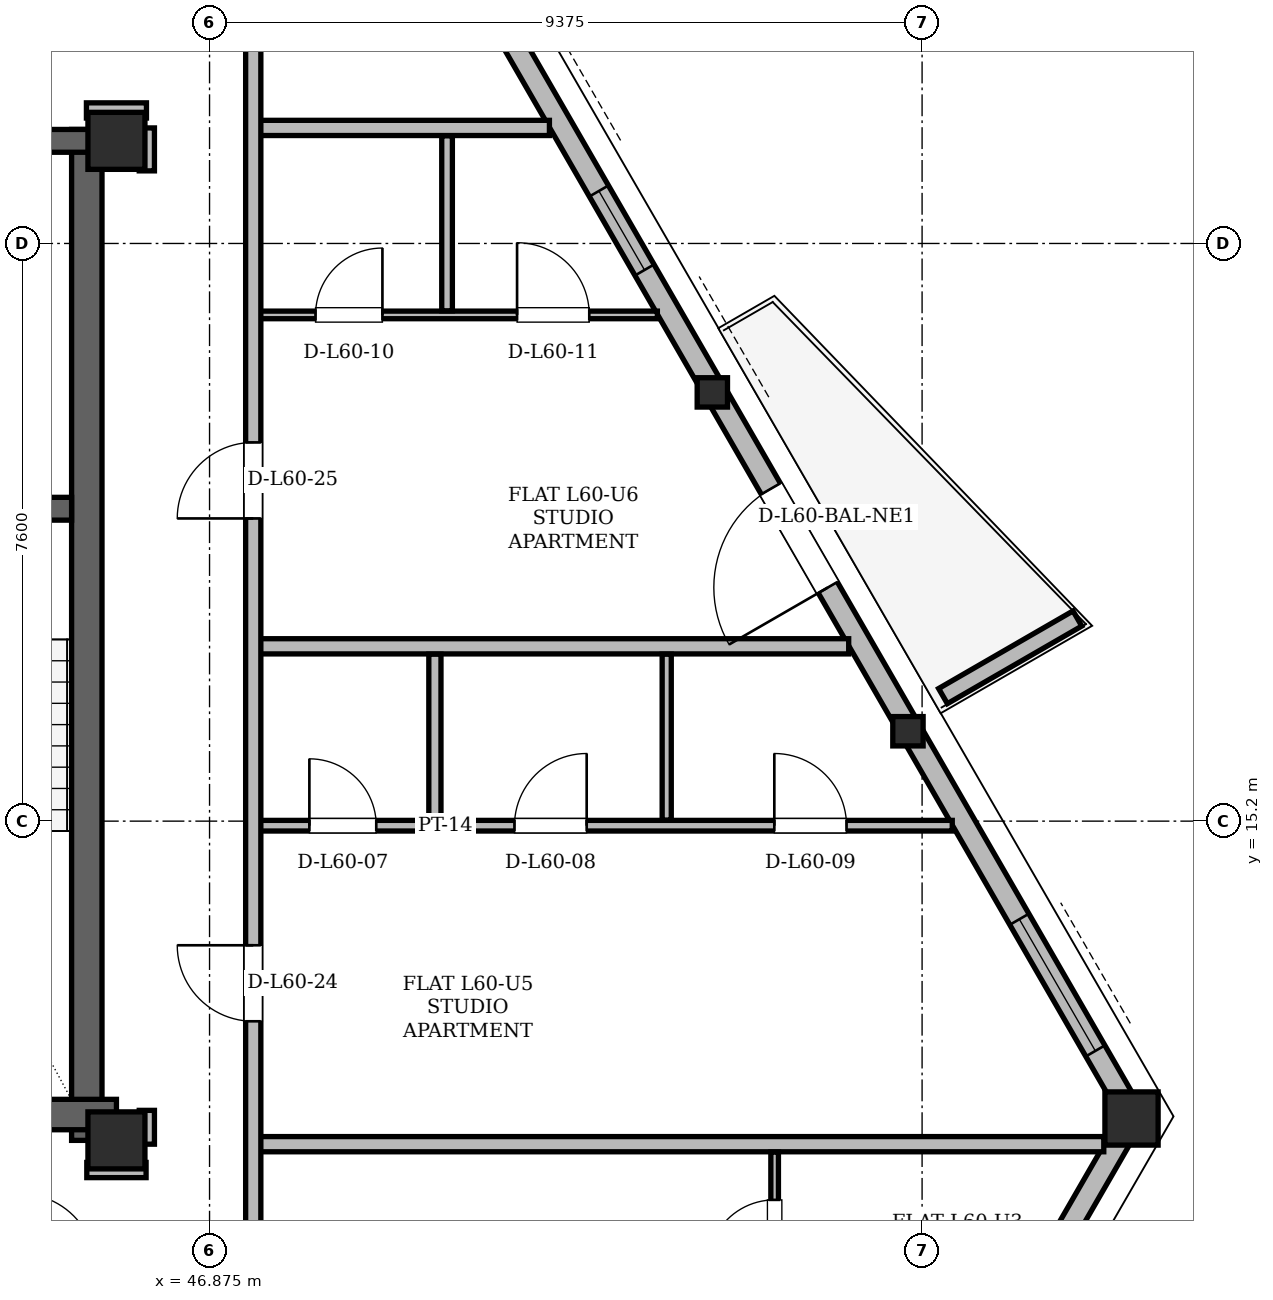
"""IFC4 building model, lengths in metres.
Left out: names, types, materials, properties, quantities, classifications, styles, units other than length and angle.
Written with IfcOpenShell. Run it as: python <this file> out.ifc"""

import sys

from ifc_helpers import new_model, si_unit, direction, frame, frame_2d, origin, origin_2d, place, context, subcontext, project, spatial, polyline, rectangle, hollow_rectangle, i_section, outline, extrude, element, fill, save


model = new_model("IFC4")
c1 = context("Model", 3, precision=1e-05, world=origin(), true_north=direction((0.0, 1.0)))
c2 = subcontext(c1, "Body", "Model", "MODEL_VIEW")
j1 = project(units=[si_unit("LENGTHUNIT", "METRE"), si_unit("PLANEANGLEUNIT", "RADIAN")], contexts=[c1])
p1 = place(None, origin())
s1 = spatial("IfcSite", under=j1, at=p1, CompositionType="ELEMENT")
p2 = place(p1, origin())
s2 = spatial("IfcBuilding", under=s1, at=p2, CompositionType="ELEMENT")
p3 = place(p2, frame((0.0, 0.0, 227.1)))
s3 = spatial("IfcBuildingStorey", under=s2, at=p3, CompositionType="ELEMENT", Elevation=227.1)
for number, where, z_axis, x_axis in (
    (1, (45.65, 11.0, 0.0), (0.0, 0.0, 1.0), (1.0, 0.0, 0.0)),
    (2, (45.65, 24.15, 0.0), (0.0, 0.0, 1.0), (1.0, 0.0, 0.0)),
):
    element("IfcColumn", number, at=place(p3, frame(where, z_axis=z_axis, x_axis=x_axis)), inside=s3, PredefinedType="COLUMN", context=c2, shape_type="SweptSolid", body=[
        extrude(hollow_rectangle(XDim=0.75, YDim=0.75, WallThickness=0.06, at=origin_2d()), origin(), (0.0, 0.0, 1.0), 3.6),
    ])
p4 = place(p3, frame((59.027, 11.316, 0.004), z_axis=(-0.011895219528, -0.015429799045, 0.999810194514), x_axis=(0.791975050651, -0.610553453145, 0.0)))
e3 = element("IfcColumn", 3, at=p4, inside=s3, PredefinedType="COLUMN", context=c2, shape_type="SweptSolid", body=[
    extrude(hollow_rectangle(XDim=0.7, YDim=0.7, WallThickness=0.055, at=origin_2d()), origin(), (0.0, 0.0, 1.0), 3.592),
])
p5 = place(p3, frame((56.088, 16.407, 0.004), z_axis=(-0.013118912573, -0.013390807134, 0.999824274769), x_axis=(0.714321588262, -0.699817596622, 0.0)))
e4 = element("IfcColumn", 4, at=p5, inside=s3, PredefinedType="COLUMN", context=c2, shape_type="SweptSolid", body=[
    extrude(i_section(OverallWidth=0.399, OverallDepth=0.386, WebThickness=0.021, FlangeThickness=0.033, at=origin_2d()), origin(), (0.0, 0.0, 1.0), 3.592),
])
p6 = place(p3, frame((53.516, 20.861, 0.004), z_axis=(-0.014138644368, -0.011555622801, 0.999833269259), x_axis=(0.632832277922, -0.774288904751, 0.0)))
e5 = element("IfcColumn", 5, at=p6, inside=s3, PredefinedType="COLUMN", context=c2, shape_type="SweptSolid", body=[
    extrude(i_section(OverallWidth=0.399, OverallDepth=0.386, WebThickness=0.021, FlangeThickness=0.033, at=origin_2d()), origin(), (0.0, 0.0, 1.0), 3.592),
])
p7 = place(p3, frame((45.26, 11.0, 0.0), z_axis=(0.0, 0.0, 1.0), x_axis=(0.0, 1.0, 0.0)))
e6 = element("IfcWall", 6, at=p7, inside=s3, PredefinedType="SHEAR", context=c2, shape_type="SweptSolid", body=[
    extrude(rectangle(XDim=13.3, YDim=0.4, at=frame_2d((6.65, 0.0))), origin(), (0.0, 0.0, 1.0), 3.38),
])
p8 = place(p3, frame((38.55, 11.34, 0.0), z_axis=(0.0, 0.0, 1.0), x_axis=(1.0, 0.0, 0.0)))
e7 = element("IfcWall", 7, at=p8, inside=s3, PredefinedType="SHEAR", context=c2, shape_type="SweptSolid", body=[
    extrude(rectangle(XDim=7.1, YDim=0.4, at=frame_2d((3.55, 0.0))), origin(), (0.0, 0.0, 1.0), 3.38),
])
p9 = place(p3, frame((29.65, 24.15, 0.0), z_axis=(0.0, 0.0, 1.0), x_axis=(1.0, 0.0, 0.0)))
e8 = element("IfcWall", 8, at=p9, inside=s3, PredefinedType="SHEAR", context=c2, shape_type="SweptSolid", body=[
    extrude(rectangle(XDim=15.7, YDim=0.3, at=frame_2d((7.85, 0.0))), origin(), (0.0, 0.0, 1.0), 3.38),
])
p10 = place(p9, frame((1.7, 0.0, 0.0)))
e9 = element("IfcOpeningElement", 9, at=p10, cuts=e8, PredefinedType="OPENING", context=c2, shape_type="SweptSolid", body=[
    extrude(rectangle(XDim=1.2, YDim=2.2, at=frame_2d((0.6, 1.1))), frame((0.0, 0.15, 0.0), z_axis=(0.0, -1.0, 0.0), x_axis=(1.0, 0.0, 0.0)), (0.0, 0.0, 1.0), 0.3),
])
p11 = place(p9, frame((12.8, 0.0, 0.0)))
e10 = element("IfcOpeningElement", 10, at=p11, cuts=e8, PredefinedType="OPENING", context=c2, shape_type="SweptSolid", body=[
    extrude(rectangle(XDim=1.2, YDim=2.2, at=frame_2d((0.6, 1.1))), frame((0.0, 0.15, 0.0), z_axis=(0.0, -1.0, 0.0), x_axis=(1.0, 0.0, 0.0)), (0.0, 0.0, 1.0), 0.3),
])
p12 = place(p9, frame((6.55, 0.0, 0.0)))
e11 = element("IfcOpeningElement", 11, at=p12, cuts=e8, PredefinedType="OPENING", context=c2, shape_type="SweptSolid", body=[
    extrude(rectangle(XDim=0.9, YDim=2.05, at=frame_2d((0.45, 1.025))), frame((0.0, 0.15, 0.0), z_axis=(0.0, -1.0, 0.0), x_axis=(1.0, 0.0, 0.0)), (0.0, 0.0, 1.0), 0.3),
])
p13 = place(p9, frame((8.45, 0.0, 0.0)))
e12 = element("IfcOpeningElement", 12, at=p13, cuts=e8, PredefinedType="OPENING", context=c2, shape_type="SweptSolid", body=[
    extrude(rectangle(XDim=0.9, YDim=2.05, at=frame_2d((0.45, 1.025))), frame((0.0, 0.15, 0.0), z_axis=(0.0, -1.0, 0.0), x_axis=(1.0, 0.0, 0.0)), (0.0, 0.0, 1.0), 0.3),
])
p14 = place(p3, frame((41.05, 19.31, 0.0), z_axis=(0.0, 0.0, 1.0), x_axis=(1.0, 0.0, 0.0)))
e13 = element("IfcWall", 13, at=p14, inside=s3, PredefinedType="SHEAR", context=c2, shape_type="SweptSolid", body=[
    extrude(rectangle(XDim=4.01, YDim=0.3, at=frame_2d((2.005, 0.0))), origin(), (0.0, 0.0, 1.0), 3.38),
])
p15 = place(p14, frame((1.6, 0.0, 0.0)))
e14 = element("IfcOpeningElement", 14, at=p15, cuts=e13, PredefinedType="OPENING", context=c2, shape_type="SweptSolid", body=[
    extrude(rectangle(XDim=1.4, YDim=2.2, at=frame_2d((0.7, 1.1))), frame((0.0, 0.15, 0.0), z_axis=(0.0, -1.0, 0.0), x_axis=(1.0, 0.0, 0.0)), (0.0, 0.0, 1.0), 0.3),
])
p16 = place(p3, frame((55.871, 5.849, 0.0), z_axis=(0.0, 0.0, 1.0), x_axis=(0.500003697889, 0.866023268797, 0.0)))
e15 = element("IfcWall", 15, at=p16, inside=s3, PredefinedType="SOLIDWALL", context=c2, shape_type="SweptSolid", body=[
    extrude(rectangle(XDim=6.312, YDim=0.29, at=frame_2d((3.156, 0.0))), origin(), (0.0, 0.0, 1.0), 2.677),
])
p17 = place(p3, frame((59.027, 11.316, 0.0), z_axis=(0.0, 0.0, 1.0), x_axis=(-0.499999154439, 0.866025891969, 0.0)))
e16 = element("IfcWall", 16, at=p17, inside=s3, PredefinedType="SOLIDWALL", context=c2, shape_type="SweptSolid", body=[
    extrude(rectangle(XDim=16.421, YDim=0.29, at=frame_2d((8.21, 0.0))), origin(), (0.0, 0.0, 1.0), 2.677),
])
p18 = place(p17, frame((8.034, 0.0, 0.0)))
e17 = element("IfcOpeningElement", 17, at=p18, cuts=e16, PredefinedType="OPENING", context=c2, shape_type="SweptSolid", body=[
    extrude(rectangle(XDim=1.5, YDim=2.2, at=frame_2d((0.75, 1.1))), frame((0.0, 0.145, 0.0), z_axis=(0.0, -1.0, 0.0), x_axis=(1.0, 0.0, 0.0)), (0.0, 0.0, 1.0), 0.29),
])
p19 = place(p17, frame((0.995, 0.0, 0.85)))
e18 = element("IfcOpeningElement", 18, at=p19, cuts=e16, PredefinedType="OPENING", context=c2, shape_type="SweptSolid", body=[
    extrude(rectangle(XDim=2.0, YDim=1.717, at=frame_2d((1.0, 0.858))), frame((0.0, 0.145, 0.0), z_axis=(0.0, -1.0, 0.0), x_axis=(1.0, 0.0, 0.0)), (0.0, 0.0, 1.0), 0.29),
])
p20 = place(p17, frame((12.858, 0.0, 0.85)))
e19 = element("IfcOpeningElement", 19, at=p20, cuts=e16, PredefinedType="OPENING", context=c2, shape_type="SweptSolid", body=[
    extrude(rectangle(XDim=1.2, YDim=1.48, at=frame_2d((0.6, 0.74))), frame((0.0, 0.145, 0.0), z_axis=(0.0, -1.0, 0.0), x_axis=(1.0, 0.0, 0.0)), (0.0, 0.0, 1.0), 0.29),
])
p21 = place(p3, frame((56.525, 16.845, 0.0), z_axis=(0.0, 0.0, 1.0), x_axis=(0.866012356593, 0.500022597718, 0.0)))
e20 = element("IfcWall", 20, at=p21, inside=s3, PredefinedType="PARAPET", context=c2, shape_type="SweptSolid", body=[
    extrude(outline(polyline([(0.0, 0.0), (2.042, 0.0), (2.042, 1.1), (0.0, 1.32), (0.0, 0.0)])), frame((0.0, 0.115, 0.0), z_axis=(0.0, -1.0, 0.0), x_axis=(1.0, 0.0, 0.0)), (0.0, 0.0, 1.0), 0.23),
])
p22 = place(p3, frame((45.26, 10.61, 0.0), z_axis=(0.0, 0.0, 1.0), x_axis=(1.0, 0.0, 0.0)))
e21 = element("IfcWall", 21, at=p22, inside=s3, PredefinedType="PARTITIONING", context=c2, shape_type="SweptSolid", body=[
    extrude(rectangle(XDim=0.78, YDim=0.2, at=frame_2d((0.39, 0.0))), origin(), (0.0, 0.0, 1.0), 3.38),
])
p23 = place(p3, frame((47.45, 10.95, 0.0), z_axis=(0.0, 0.0, 1.0), x_axis=(1.0, 0.0, 0.0)))
e22 = element("IfcWall", 22, at=p23, inside=s3, PredefinedType="PARTITIONING", context=c2, shape_type="SweptSolid", body=[
    extrude(rectangle(XDim=11.19, YDim=0.2, at=frame_2d((5.595, 0.0))), origin(), (0.0, 0.0, 1.0), 2.913),
])
p24 = place(p3, frame((47.4, 15.14, 0.0), z_axis=(0.0, 0.0, 1.0), x_axis=(1.0, 0.0, 0.0)))
e23 = element("IfcWall", 23, at=p24, inside=s3, PredefinedType="PARTITIONING", context=c2, shape_type="SweptSolid", body=[
    extrude(rectangle(XDim=9.247, YDim=0.14, at=frame_2d((4.624, 0.0))), origin(), (0.0, 0.0, 1.0), 3.38),
])
p25 = place(p24, frame((0.789, 0.0, 0.0)))
e24 = element("IfcOpeningElement", 24, at=p25, cuts=e23, PredefinedType="OPENING", context=c2, shape_type="SweptSolid", body=[
    extrude(rectangle(XDim=0.88, YDim=2.08, at=frame_2d((0.44, 1.04))), frame((0.0, 0.07, 0.0), z_axis=(0.0, -1.0, 0.0), x_axis=(1.0, 0.0, 0.0)), (0.0, 0.0, 1.0), 0.14),
])
p26 = place(p24, frame((3.487, 0.0, 0.0)))
e25 = element("IfcOpeningElement", 25, at=p26, cuts=e23, PredefinedType="OPENING", context=c2, shape_type="SweptSolid", body=[
    extrude(rectangle(XDim=0.95, YDim=2.1, at=frame_2d((0.475, 1.05))), frame((0.0, 0.07, 0.0), z_axis=(0.0, -1.0, 0.0), x_axis=(1.0, 0.0, 0.0)), (0.0, 0.0, 1.0), 0.14),
])
p27 = place(p24, frame((6.906, 0.0, 0.0)))
e26 = element("IfcOpeningElement", 26, at=p27, cuts=e23, PredefinedType="OPENING", context=c2, shape_type="SweptSolid", body=[
    extrude(rectangle(XDim=0.95, YDim=2.1, at=frame_2d((0.475, 1.05))), frame((0.0, 0.07, 0.0), z_axis=(0.0, -1.0, 0.0), x_axis=(1.0, 0.0, 0.0)), (0.0, 0.0, 1.0), 0.14),
])
p28 = place(p3, frame((47.45, 17.5, 0.0), z_axis=(0.0, 0.0, 1.0), x_axis=(1.0, 0.0, 0.0)))
e27 = element("IfcWall", 27, at=p28, inside=s3, PredefinedType="PARTITIONING", context=c2, shape_type="SweptSolid", body=[
    extrude(rectangle(XDim=7.834, YDim=0.2, at=frame_2d((3.917, 0.0))), origin(), (0.0, 0.0, 1.0), 3.38),
])
p29 = place(p3, frame((47.4, 21.86, 0.0), z_axis=(0.0, 0.0, 1.0), x_axis=(1.0, 0.0, 0.0)))
e28 = element("IfcWall", 28, at=p29, inside=s3, PredefinedType="PARTITIONING", context=c2, shape_type="SweptSolid", body=[
    extrude(rectangle(XDim=5.367, YDim=0.1, at=frame_2d((2.684, 0.0))), origin(), (0.0, 0.0, 1.0), 3.38),
])
p30 = place(p29, frame((0.87, 0.0, 0.0)))
e29 = element("IfcOpeningElement", 29, at=p30, cuts=e28, PredefinedType="OPENING", context=c2, shape_type="SweptSolid", body=[
    extrude(rectangle(XDim=0.88, YDim=2.08, at=frame_2d((0.44, 1.04))), frame((0.0, 0.05, 0.0), z_axis=(0.0, -1.0, 0.0), x_axis=(1.0, 0.0, 0.0)), (0.0, 0.0, 1.0), 0.1),
])
p31 = place(p29, frame((3.521, 0.0, 0.0)))
e30 = element("IfcOpeningElement", 30, at=p31, cuts=e28, PredefinedType="OPENING", context=c2, shape_type="SweptSolid", body=[
    extrude(rectangle(XDim=0.95, YDim=2.1, at=frame_2d((0.475, 1.05))), frame((0.0, 0.05, 0.0), z_axis=(0.0, -1.0, 0.0), x_axis=(1.0, 0.0, 0.0)), (0.0, 0.0, 1.0), 0.1),
])
p32 = place(p3, frame((47.45, 24.32, 0.0), z_axis=(0.0, 0.0, 1.0), x_axis=(1.0, 0.0, 0.0)))
e31 = element("IfcWall", 31, at=p32, inside=s3, PredefinedType="PARTITIONING", context=c2, shape_type="SweptSolid", body=[
    extrude(rectangle(XDim=3.897, YDim=0.2, at=frame_2d((1.948, 0.0))), origin(), (0.0, 0.0, 1.0), 3.38),
])
p33 = place(p3, frame((45.255, 24.55, 0.0), z_axis=(0.0, 0.0, 1.0), x_axis=(1.0, 0.0, 0.0)))
e32 = element("IfcWall", 32, at=p33, inside=s3, PredefinedType="PARTITIONING", context=c2, shape_type="SweptSolid", body=[
    extrude(rectangle(XDim=0.79, YDim=0.2, at=frame_2d((0.395, 0.0))), origin(), (0.0, 0.0, 1.0), 2.913),
])
p34 = place(p3, frame((46.05, 10.95, 0.0), z_axis=(0.0, 0.0, 1.0), x_axis=(0.0, 1.0, 0.0)))
e33 = element("IfcWall", 33, at=p34, inside=s3, PredefinedType="PARTITIONING", context=c2, shape_type="SweptSolid", body=[
    extrude(rectangle(XDim=0.445, YDim=0.2, at=frame_2d((0.223, 0.0))), origin(), (0.0, 0.0, 1.0), 2.913),
])
p35 = place(p3, frame((46.05, 23.755, 0.0), z_axis=(0.0, 0.0, 1.0), x_axis=(0.0, 1.0, 0.0)))
e34 = element("IfcWall", 34, at=p35, inside=s3, PredefinedType="PARTITIONING", context=c2, shape_type="SweptSolid", body=[
    extrude(rectangle(XDim=0.565, YDim=0.2, at=frame_2d((0.283, 0.0))), origin(), (0.0, 0.0, 1.0), 3.38),
])
p36 = place(p3, frame((47.45, 9.404, 0.0), z_axis=(0.0, 0.0, 1.0), x_axis=(0.0, 1.0, 0.0)))
e35 = element("IfcWall", 35, at=p36, inside=s3, PredefinedType="PARTITIONING", context=c2, shape_type="SweptSolid", body=[
    extrude(rectangle(XDim=16.462, YDim=0.2, at=frame_2d((8.231, 0.0))), origin(), (0.0, 0.0, 1.0), 2.913),
])
p37 = place(p36, frame((3.163, 0.0, 0.0)))
e36 = element("IfcOpeningElement", 36, at=p37, cuts=e35, PredefinedType="OPENING", context=c2, shape_type="SweptSolid", body=[
    extrude(rectangle(XDim=1.0, YDim=2.18, at=frame_2d((0.5, 1.09))), frame((0.0, 0.1, 0.0), z_axis=(0.0, -1.0, 0.0), x_axis=(1.0, 0.0, 0.0)), (0.0, 0.0, 1.0), 0.2),
])
p38 = place(p36, frame((9.778, 0.0, 0.0)))
e37 = element("IfcOpeningElement", 37, at=p38, cuts=e35, PredefinedType="OPENING", context=c2, shape_type="SweptSolid", body=[
    extrude(rectangle(XDim=1.0, YDim=2.18, at=frame_2d((0.5, 1.09))), frame((0.0, 0.1, 0.0), z_axis=(0.0, -1.0, 0.0), x_axis=(1.0, 0.0, 0.0)), (0.0, 0.0, 1.0), 0.2),
])
p39 = place(p3, frame((49.84, 15.214, 0.0), z_axis=(0.0, 0.0, 1.0), x_axis=(0.0, 1.0, 0.0)))
e38 = element("IfcWall", 38, at=p39, inside=s3, PredefinedType="PARTITIONING", context=c2, shape_type="SweptSolid", body=[
    extrude(rectangle(XDim=2.182, YDim=0.16, at=frame_2d((1.091, 0.0))), origin(), (0.0, 0.0, 1.0), 3.38),
])
p40 = place(p3, frame((50.0, 21.914, 0.0), z_axis=(0.0, 0.0, 1.0), x_axis=(0.0, 1.0, 0.0)))
e39 = element("IfcWall", 39, at=p40, inside=s3, PredefinedType="PARTITIONING", context=c2, shape_type="SweptSolid", body=[
    extrude(rectangle(XDim=2.302, YDim=0.14, at=frame_2d((1.151, 0.0))), origin(), (0.0, 0.0, 1.0), 3.38),
])
p41 = place(p3, frame((52.89, 15.214, 0.0), z_axis=(0.0, 0.0, 1.0), x_axis=(0.0, 1.0, 0.0)))
e40 = element("IfcWall", 40, at=p41, inside=s3, PredefinedType="PARTITIONING", context=c2, shape_type="SweptSolid", body=[
    extrude(rectangle(XDim=2.182, YDim=0.12, at=frame_2d((1.091, 0.0))), origin(), (0.0, 0.0, 1.0), 3.38),
])
p42 = place(p3, frame((54.31, 5.998, 0.0), z_axis=(0.0, 0.0, 1.0), x_axis=(0.0, 1.0, 0.0)))
e41 = element("IfcWall", 41, at=p42, inside=s3, PredefinedType="PARTITIONING", context=c2, shape_type="SweptSolid", body=[
    extrude(rectangle(XDim=4.848, YDim=0.1, at=frame_2d((2.424, 0.0))), origin(), (0.0, 0.0, 1.0), 2.913),
])
p43 = place(p42, frame((0.799, 0.0, 0.0)))
e42 = element("IfcOpeningElement", 42, at=p43, cuts=e41, PredefinedType="OPENING", context=c2, shape_type="SweptSolid", body=[
    extrude(rectangle(XDim=0.95, YDim=2.1, at=frame_2d((0.475, 1.05))), frame((0.0, 0.05, 0.0), z_axis=(0.0, -1.0, 0.0), x_axis=(1.0, 0.0, 0.0)), (0.0, 0.0, 1.0), 0.1),
])
p44 = place(p42, frame((3.339, 0.0, 0.0)))
e43 = element("IfcOpeningElement", 43, at=p44, cuts=e41, PredefinedType="OPENING", context=c2, shape_type="SweptSolid", body=[
    extrude(rectangle(XDim=0.88, YDim=2.08, at=frame_2d((0.44, 1.04))), frame((0.0, 0.05, 0.0), z_axis=(0.0, -1.0, 0.0), x_axis=(1.0, 0.0, 0.0)), (0.0, 0.0, 1.0), 0.1),
])
p45 = place(p18, origin())
e44 = element("IfcDoor", 44, at=p45, inside=s3, OperationType="SINGLE_SWING_LEFT", PredefinedType="DOOR", context=c2, shape_type="SweptSolid", body=[
    extrude(rectangle(XDim=1.5, YDim=2.2, at=frame_2d((0.75, 1.1))), frame((0.0, 0.025, 0.0), z_axis=(0.0, -1.0, 0.0), x_axis=(1.0, 0.0, 0.0)), (0.0, 0.0, 1.0), 0.05),
])
fill(e17, e44)
p46 = place(p19, origin())
e45 = element("IfcWindow", 45, at=p46, inside=s3, PartitioningType="SINGLE_PANEL", PredefinedType="WINDOW", context=c2, shape_type="SweptSolid", body=[
    extrude(rectangle(XDim=2.0, YDim=1.717, at=frame_2d((1.0, 0.858))), frame((0.0, 0.03, 0.0), z_axis=(0.0, -1.0, 0.0), x_axis=(1.0, 0.0, 0.0)), (0.0, 0.0, 1.0), 0.06),
])
fill(e18, e45)
p47 = place(p20, origin())
e46 = element("IfcWindow", 46, at=p47, inside=s3, PartitioningType="SINGLE_PANEL", PredefinedType="WINDOW", context=c2, shape_type="SweptSolid", body=[
    extrude(rectangle(XDim=1.2, YDim=1.48, at=frame_2d((0.6, 0.74))), frame((0.0, 0.03, 0.0), z_axis=(0.0, -1.0, 0.0), x_axis=(1.0, 0.0, 0.0)), (0.0, 0.0, 1.0), 0.06),
])
fill(e19, e46)
p48 = place(p25, origin())
e47 = element("IfcDoor", 47, at=p48, inside=s3, OperationType="SINGLE_SWING_LEFT", PredefinedType="DOOR", context=c2, shape_type="SweptSolid", body=[
    extrude(rectangle(XDim=0.88, YDim=2.08, at=frame_2d((0.44, 1.04))), frame((0.0, 0.025, 0.0), z_axis=(0.0, -1.0, 0.0), x_axis=(1.0, 0.0, 0.0)), (0.0, 0.0, 1.0), 0.05),
])
fill(e24, e47)
p49 = place(p26, origin())
e48 = element("IfcDoor", 48, at=p49, inside=s3, OperationType="SINGLE_SWING_RIGHT", PredefinedType="DOOR", context=c2, shape_type="SweptSolid", body=[
    extrude(rectangle(XDim=0.95, YDim=2.1, at=frame_2d((0.475, 1.05))), frame((0.0, 0.025, 0.0), z_axis=(0.0, -1.0, 0.0), x_axis=(1.0, 0.0, 0.0)), (0.0, 0.0, 1.0), 0.05),
])
fill(e25, e48)
p50 = place(p27, origin())
e49 = element("IfcDoor", 49, at=p50, inside=s3, OperationType="SINGLE_SWING_LEFT", PredefinedType="DOOR", context=c2, shape_type="SweptSolid", body=[
    extrude(rectangle(XDim=0.95, YDim=2.1, at=frame_2d((0.475, 1.05))), frame((0.0, 0.025, 0.0), z_axis=(0.0, -1.0, 0.0), x_axis=(1.0, 0.0, 0.0)), (0.0, 0.0, 1.0), 0.05),
])
fill(e26, e49)
p51 = place(p30, origin())
e50 = element("IfcDoor", 50, at=p51, inside=s3, OperationType="SINGLE_SWING_RIGHT", PredefinedType="DOOR", context=c2, shape_type="SweptSolid", body=[
    extrude(rectangle(XDim=0.88, YDim=2.08, at=frame_2d((0.44, 1.04))), frame((0.0, 0.025, 0.0), z_axis=(0.0, -1.0, 0.0), x_axis=(1.0, 0.0, 0.0)), (0.0, 0.0, 1.0), 0.05),
])
fill(e29, e50)
p52 = place(p31, origin())
e51 = element("IfcDoor", 51, at=p52, inside=s3, OperationType="SINGLE_SWING_LEFT", PredefinedType="DOOR", context=c2, shape_type="SweptSolid", body=[
    extrude(rectangle(XDim=0.95, YDim=2.1, at=frame_2d((0.475, 1.05))), frame((0.0, 0.025, 0.0), z_axis=(0.0, -1.0, 0.0), x_axis=(1.0, 0.0, 0.0)), (0.0, 0.0, 1.0), 0.05),
])
fill(e30, e51)
p53 = place(p37, origin())
e52 = element("IfcDoor", 52, at=p53, inside=s3, OperationType="SINGLE_SWING_RIGHT", PredefinedType="DOOR", context=c2, shape_type="SweptSolid", body=[
    extrude(rectangle(XDim=1.0, YDim=2.18, at=frame_2d((0.5, 1.09))), frame((0.0, 0.025, 0.0), z_axis=(0.0, -1.0, 0.0), x_axis=(1.0, 0.0, 0.0)), (0.0, 0.0, 1.0), 0.05),
])
fill(e36, e52)
p54 = place(p38, origin())
e53 = element("IfcDoor", 53, at=p54, inside=s3, OperationType="SINGLE_SWING_LEFT", PredefinedType="DOOR", context=c2, shape_type="SweptSolid", body=[
    extrude(rectangle(XDim=1.0, YDim=2.18, at=frame_2d((0.5, 1.09))), frame((0.0, 0.025, 0.0), z_axis=(0.0, -1.0, 0.0), x_axis=(1.0, 0.0, 0.0)), (0.0, 0.0, 1.0), 0.05),
])
fill(e37, e53)
p55 = place(p44, origin())
e54 = element("IfcDoor", 54, at=p55, inside=s3, OperationType="SINGLE_SWING_LEFT", PredefinedType="DOOR", context=c2, shape_type="SweptSolid", body=[
    extrude(rectangle(XDim=0.88, YDim=2.08, at=frame_2d((0.44, 1.04))), frame((0.0, 0.025, 0.0), z_axis=(0.0, -1.0, 0.0), x_axis=(1.0, 0.0, 0.0)), (0.0, 0.0, 1.0), 0.05),
])
fill(e43, e54)
save(model, sys.argv[1])
